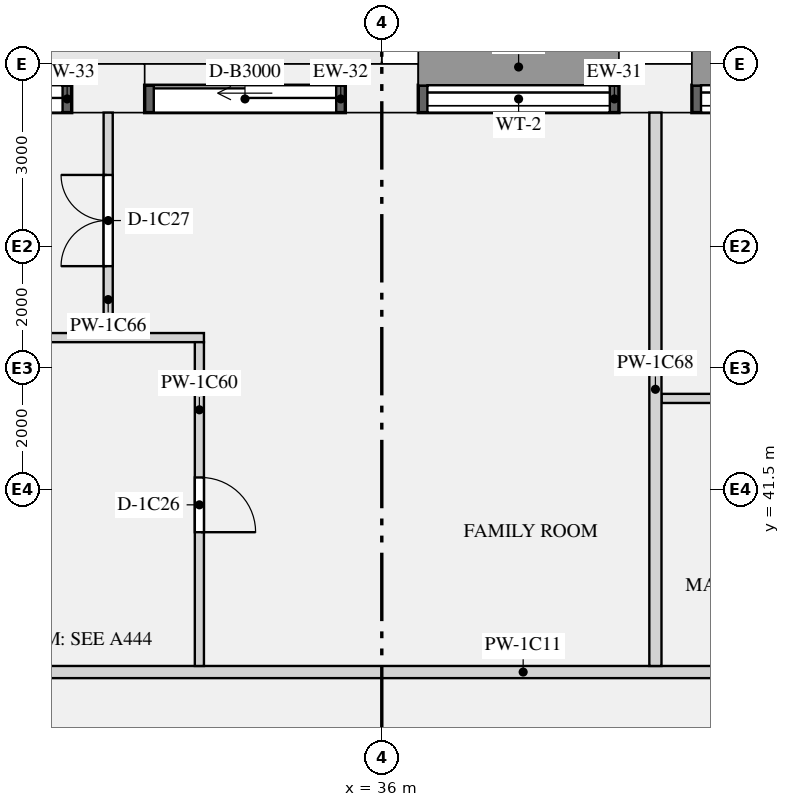
"""IFC4 building model, lengths in metres.
Left out: names, types, materials, properties, quantities, classifications, styles, units other than length and angle.
Written with IfcOpenShell. Run it as: python <this file> out.ifc"""

import sys

from ifc_helpers import new_model, si_unit, direction, frame, frame_2d, origin, origin_2d, place, context, subcontext, project, spatial, rectangle, extrude, element, fill, save


model = new_model("IFC4")
c1 = context("Model", 3, precision=1e-05, world=origin(), true_north=direction((0.0, 1.0)))
c2 = subcontext(c1, "Body", "Model", "MODEL_VIEW")
j1 = project(units=[si_unit("LENGTHUNIT", "METRE"), si_unit("PLANEANGLEUNIT", "RADIAN")], contexts=[c1])
p1 = place(None, origin())
s1 = spatial("IfcSite", under=j1, at=p1, CompositionType="ELEMENT")
p2 = place(p1, origin())
s2 = spatial("IfcBuilding", under=s1, at=p2, CompositionType="ELEMENT")
p3 = place(p2, frame((0.0, 0.0, 38.4)))
s3 = spatial("IfcBuildingStorey", under=s2, at=p3, CompositionType="ELEMENT", Elevation=38.4)
for number, where, z_axis, x_axis in (
    (1, (40.5, 48.1, 0.0), (0.0, 0.0, 1.0), (-1.0, 0.0, 0.0)),
    (2, (36.0, 48.1, 0.0), (0.0, 0.0, 1.0), (-1.0, 0.0, 0.0)),
    (3, (31.5, 48.1, 0.0), (0.0, 0.0, 1.0), (-1.0, 0.0, 0.0)),
):
    element("IfcColumn", number, at=place(p3, frame(where, z_axis=z_axis, x_axis=x_axis)), inside=s3, PredefinedType="USERDEFINED", context=c2, shape_type="SweptSolid", body=[
        extrude(rectangle(XDim=1.2, YDim=0.8, at=origin_2d()), origin(), (0.0, 0.0, 1.0), 3.15),
    ])
p4 = place(p3, frame((44.4, 47.925, 0.9), z_axis=(0.0, 0.0, 1.0), x_axis=(-1.0, 0.0, 0.0)))
e4 = element("IfcWall", 4, at=p4, inside=s3, PredefinedType="SOLIDWALL", context=c2, shape_type="SweptSolid", body=[
    extrude(rectangle(XDim=3.3, YDim=0.45, at=frame_2d((1.65, 0.0))), origin(), (0.0, 0.0, 1.0), 1.93),
])
p5 = place(p4, frame((0.15, 0.0, 0.15)))
e5 = element("IfcOpeningElement", 5, at=p5, cuts=e4, PredefinedType="OPENING", context=c2, shape_type="SweptSolid", body=[
    extrude(rectangle(XDim=3.0, YDim=1.5, at=frame_2d((1.5, 0.75))), frame((0.0, 0.235, 0.0), z_axis=(0.0, -1.0, 0.0), x_axis=(1.0, 0.0, 0.0)), (0.0, 0.0, 1.0), 0.47),
])
p6 = place(p3, frame((39.9, 47.925, 0.9), z_axis=(0.0, 0.0, 1.0), x_axis=(-1.0, 0.0, 0.0)))
e6 = element("IfcWall", 6, at=p6, inside=s3, PredefinedType="SOLIDWALL", context=c2, shape_type="SweptSolid", body=[
    extrude(rectangle(XDim=3.3, YDim=0.45, at=frame_2d((1.65, 0.0))), origin(), (0.0, 0.0, 1.0), 1.93),
])
p7 = place(p6, frame((0.15, 0.0, 0.15)))
e7 = element("IfcOpeningElement", 7, at=p7, cuts=e6, PredefinedType="OPENING", context=c2, shape_type="SweptSolid", body=[
    extrude(rectangle(XDim=3.0, YDim=1.5, at=frame_2d((1.5, 0.75))), frame((0.0, 0.235, 0.0), z_axis=(0.0, -1.0, 0.0), x_axis=(1.0, 0.0, 0.0)), (0.0, 0.0, 1.0), 0.47),
])
p8 = place(p3, frame((35.4, 47.925, 0.0), z_axis=(0.0, 0.0, 1.0), x_axis=(-1.0, 0.0, 0.0)))
e8 = element("IfcWall", 8, at=p8, inside=s3, PredefinedType="SOLIDWALL", context=c2, shape_type="SweptSolid", body=[
    extrude(rectangle(XDim=3.3, YDim=0.45, at=frame_2d((1.65, 0.0))), origin(), (0.0, 0.0, 1.0), 2.83),
])
p9 = place(p8, frame((0.15, 0.0, 0.0)))
e9 = element("IfcOpeningElement", 9, at=p9, cuts=e8, PredefinedType="OPENING", context=c2, shape_type="SweptSolid", body=[
    extrude(rectangle(XDim=3.0, YDim=2.3, at=frame_2d((1.5, 1.15))), frame((0.0, 0.235, 0.0), z_axis=(0.0, -1.0, 0.0), x_axis=(1.0, 0.0, 0.0)), (0.0, 0.0, 1.0), 0.47),
])
p10 = place(p3, frame((30.9, 47.925, 0.0), z_axis=(0.0, 0.0, 1.0), x_axis=(-1.0, 0.0, 0.0)))
e10 = element("IfcWall", 10, at=p10, inside=s3, PredefinedType="SOLIDWALL", context=c2, shape_type="SweptSolid", body=[
    extrude(rectangle(XDim=3.3, YDim=0.45, at=frame_2d((1.65, 0.0))), origin(), (0.0, 0.0, 1.0), 2.83),
])
p11 = place(p10, frame((0.15, 0.0, 0.0)))
e11 = element("IfcOpeningElement", 11, at=p11, cuts=e10, PredefinedType="OPENING", context=c2, shape_type="SweptSolid", body=[
    extrude(rectangle(XDim=3.0, YDim=2.3, at=frame_2d((1.5, 1.15))), frame((0.0, 0.235, 0.0), z_axis=(0.0, -1.0, 0.0), x_axis=(1.0, 0.0, 0.0)), (0.0, 0.0, 1.0), 0.47),
])
p12 = place(p3, frame((23.9, 38.5, 0.0), z_axis=(0.0, 0.0, 1.0), x_axis=(1.0, 0.0, 0.0)))
e12 = element("IfcWall", 12, at=p12, inside=s3, PredefinedType="PARTITIONING", context=c2, shape_type="SweptSolid", body=[
    extrude(rectangle(XDim=24.2, YDim=0.2, at=frame_2d((12.1, 0.0))), origin(), (0.0, 0.0, 1.0), 2.83),
])
p13 = place(p12, frame((3.55, 0.0, 0.0)))
e13 = element("IfcOpeningElement", 13, at=p13, cuts=e12, PredefinedType="OPENING", context=c2, shape_type="SweptSolid", body=[
    extrude(rectangle(XDim=1.1, YDim=2.1, at=frame_2d((0.55, 1.05))), frame((0.0, 0.11, 0.0), z_axis=(0.0, -1.0, 0.0), x_axis=(1.0, 0.0, 0.0)), (0.0, 0.0, 1.0), 0.22),
])
p14 = place(p3, frame((5.3, 44.0, 0.0), z_axis=(0.0, 0.0, 1.0), x_axis=(1.0, 0.0, 0.0)))
e14 = element("IfcWall", 14, at=p14, inside=s3, PredefinedType="PARTITIONING", context=c2, shape_type="SweptSolid", body=[
    extrude(rectangle(XDim=27.775, YDim=0.15, at=frame_2d((13.887, 0.0))), origin(), (0.0, 0.0, 1.0), 2.83),
])
p15 = place(p14, frame((14.5, 0.0, 0.0)))
e15 = element("IfcOpeningElement", 15, at=p15, cuts=e14, PredefinedType="OPENING", context=c2, shape_type="SweptSolid", body=[
    extrude(rectangle(XDim=0.9, YDim=2.1, at=frame_2d((0.45, 1.05))), frame((0.0, 0.085, 0.0), z_axis=(0.0, -1.0, 0.0), x_axis=(1.0, 0.0, 0.0)), (0.0, 0.0, 1.0), 0.17),
])
p16 = place(p14, frame((19.0, 0.0, 0.0)))
e16 = element("IfcOpeningElement", 16, at=p16, cuts=e14, PredefinedType="OPENING", context=c2, shape_type="SweptSolid", body=[
    extrude(rectangle(XDim=0.9, YDim=2.1, at=frame_2d((0.45, 1.05))), frame((0.0, 0.085, 0.0), z_axis=(0.0, -1.0, 0.0), x_axis=(1.0, 0.0, 0.0)), (0.0, 0.0, 1.0), 0.17),
])
p17 = place(p14, frame((9.35, 0.0, 0.0)))
e17 = element("IfcOpeningElement", 17, at=p17, cuts=e14, PredefinedType="OPENING", context=c2, shape_type="SweptSolid", body=[
    extrude(rectangle(XDim=0.9, YDim=2.1, at=frame_2d((0.45, 1.05))), frame((0.0, 0.085, 0.0), z_axis=(0.0, -1.0, 0.0), x_axis=(1.0, 0.0, 0.0)), (0.0, 0.0, 1.0), 0.17),
])
p18 = place(p14, frame((23.5, 0.0, 0.0)))
e18 = element("IfcOpeningElement", 18, at=p18, cuts=e14, PredefinedType="OPENING", context=c2, shape_type="SweptSolid", body=[
    extrude(rectangle(XDim=0.9, YDim=2.1, at=frame_2d((0.45, 1.05))), frame((0.0, 0.085, 0.0), z_axis=(0.0, -1.0, 0.0), x_axis=(1.0, 0.0, 0.0)), (0.0, 0.0, 1.0), 0.17),
])
p19 = place(p3, frame((40.6, 43.0, 0.0), z_axis=(0.0, 0.0, 1.0), x_axis=(1.0, 0.0, 0.0)))
e19 = element("IfcWall", 19, at=p19, inside=s3, PredefinedType="PARTITIONING", context=c2, shape_type="SweptSolid", body=[
    extrude(rectangle(XDim=8.825, YDim=0.15, at=frame_2d((4.413, 0.0))), origin(), (0.0, 0.0, 1.0), 2.83),
])
p20 = place(p19, frame((1.7, 0.0, 0.0)))
e20 = element("IfcOpeningElement", 20, at=p20, cuts=e19, PredefinedType="OPENING", context=c2, shape_type="SweptSolid", body=[
    extrude(rectangle(XDim=0.9, YDim=2.1, at=frame_2d((0.45, 1.05))), frame((0.0, 0.085, 0.0), z_axis=(0.0, -1.0, 0.0), x_axis=(1.0, 0.0, 0.0)), (0.0, 0.0, 1.0), 0.17),
])
p21 = place(p19, frame((6.2, 0.0, 0.0)))
e21 = element("IfcOpeningElement", 21, at=p21, cuts=e19, PredefinedType="OPENING", context=c2, shape_type="SweptSolid", body=[
    extrude(rectangle(XDim=0.9, YDim=2.1, at=frame_2d((0.45, 1.05))), frame((0.0, 0.085, 0.0), z_axis=(0.0, -1.0, 0.0), x_axis=(1.0, 0.0, 0.0)), (0.0, 0.0, 1.0), 0.17),
])
p22 = place(p3, frame((33.0, 38.6, 0.0), z_axis=(0.0, 0.0, 1.0), x_axis=(0.0, 1.0, 0.0)))
e22 = element("IfcWall", 22, at=p22, inside=s3, PredefinedType="PARTITIONING", context=c2, shape_type="SweptSolid", body=[
    extrude(rectangle(XDim=5.325, YDim=0.15, at=frame_2d((2.663, 0.0))), origin(), (0.0, 0.0, 1.0), 2.83),
])
p23 = place(p22, frame((2.2, 0.0, 0.0)))
e23 = element("IfcOpeningElement", 23, at=p23, cuts=e22, PredefinedType="OPENING", context=c2, shape_type="SweptSolid", body=[
    extrude(rectangle(XDim=0.9, YDim=2.1, at=frame_2d((0.45, 1.05))), frame((0.0, 0.085, 0.0), z_axis=(0.0, -1.0, 0.0), x_axis=(1.0, 0.0, 0.0)), (0.0, 0.0, 1.0), 0.17),
])
p24 = place(p3, frame((31.5, 44.075, 0.0), z_axis=(0.0, 0.0, 1.0), x_axis=(0.0, 1.0, 0.0)))
e24 = element("IfcWall", 24, at=p24, inside=s3, PredefinedType="PARTITIONING", context=c2, shape_type="SweptSolid", body=[
    extrude(rectangle(XDim=3.625, YDim=0.15, at=frame_2d((1.812, 0.0))), origin(), (0.0, 0.0, 1.0), 2.83),
])
p25 = place(p24, frame((1.1, 0.0, 0.0)))
e25 = element("IfcOpeningElement", 25, at=p25, cuts=e24, PredefinedType="OPENING", context=c2, shape_type="SweptSolid", body=[
    extrude(rectangle(XDim=1.5, YDim=2.1, at=frame_2d((0.75, 1.05))), frame((0.0, 0.085, 0.0), z_axis=(0.0, -1.0, 0.0), x_axis=(1.0, 0.0, 0.0)), (0.0, 0.0, 1.0), 0.17),
])
p26 = place(p3, frame((40.5, 38.6, 0.0), z_axis=(0.0, 0.0, 1.0), x_axis=(0.0, 1.0, 0.0)))
e26 = element("IfcWall", 26, at=p26, inside=s3, PredefinedType="PARTITIONING", context=c2, shape_type="SweptSolid", body=[
    extrude(rectangle(XDim=9.1, YDim=0.2, at=frame_2d((4.55, 0.0))), origin(), (0.0, 0.0, 1.0), 2.83),
])
p27 = place(p5, origin())
e27 = element("IfcWindow", 27, at=p27, inside=s3, PartitioningType="SINGLE_PANEL", PredefinedType="WINDOW", context=c2, shape_type="SweptSolid", body=[
    extrude(rectangle(XDim=3.0, YDim=1.5, at=frame_2d((1.5, 0.75))), frame((0.0, -0.065, 0.0), z_axis=(0.0, -1.0, 0.0), x_axis=(1.0, 0.0, 0.0)), (0.0, 0.0, 1.0), 0.06),
])
fill(e5, e27)
p28 = place(p7, origin())
e28 = element("IfcWindow", 28, at=p28, inside=s3, PartitioningType="SINGLE_PANEL", PredefinedType="WINDOW", context=c2, shape_type="SweptSolid", body=[
    extrude(rectangle(XDim=3.0, YDim=1.5, at=frame_2d((1.5, 0.75))), frame((0.0, -0.065, 0.0), z_axis=(0.0, -1.0, 0.0), x_axis=(1.0, 0.0, 0.0)), (0.0, 0.0, 1.0), 0.06),
])
fill(e7, e28)
p29 = place(p9, origin())
e29 = element("IfcDoor", 29, at=p29, inside=s3, OperationType="SLIDING_TO_LEFT", PredefinedType="DOOR", context=c2, shape_type="SweptSolid", body=[
    extrude(rectangle(XDim=3.0, YDim=2.3, at=frame_2d((1.5, 1.15))), frame((0.0, -0.07, 0.0), z_axis=(0.0, -1.0, 0.0), x_axis=(1.0, 0.0, 0.0)), (0.0, 0.0, 1.0), 0.05),
])
fill(e9, e29)
p30 = place(p11, origin())
e30 = element("IfcDoor", 30, at=p30, inside=s3, OperationType="SLIDING_TO_LEFT", PredefinedType="DOOR", context=c2, shape_type="SweptSolid", body=[
    extrude(rectangle(XDim=3.0, YDim=2.3, at=frame_2d((1.5, 1.15))), frame((0.0, -0.07, 0.0), z_axis=(0.0, -1.0, 0.0), x_axis=(1.0, 0.0, 0.0)), (0.0, 0.0, 1.0), 0.05),
])
fill(e11, e30)
p31 = place(p23, frame((0.9, 0.0, 0.0), z_axis=(0.0, 0.0, 1.0), x_axis=(-1.0, 0.0, 0.0)))
e31 = element("IfcDoor", 31, at=p31, inside=s3, OperationType="SINGLE_SWING_RIGHT", PredefinedType="DOOR", context=c2, shape_type="SweptSolid", body=[
    extrude(rectangle(XDim=0.9, YDim=2.1, at=frame_2d((0.45, 1.05))), frame((0.0, 0.025, 0.0), z_axis=(0.0, -1.0, 0.0), x_axis=(1.0, 0.0, 0.0)), (0.0, 0.0, 1.0), 0.05),
])
fill(e23, e31)
p32 = place(p25, origin())
e32 = element("IfcDoor", 32, at=p32, inside=s3, OperationType="DOUBLE_DOOR_SINGLE_SWING", PredefinedType="DOOR", context=c2, shape_type="SweptSolid", body=[
    extrude(rectangle(XDim=1.5, YDim=2.1, at=frame_2d((0.75, 1.05))), frame((0.0, 0.025, 0.0), z_axis=(0.0, -1.0, 0.0), x_axis=(1.0, 0.0, 0.0)), (0.0, 0.0, 1.0), 0.05),
])
fill(e25, e32)
save(model, sys.argv[1])
